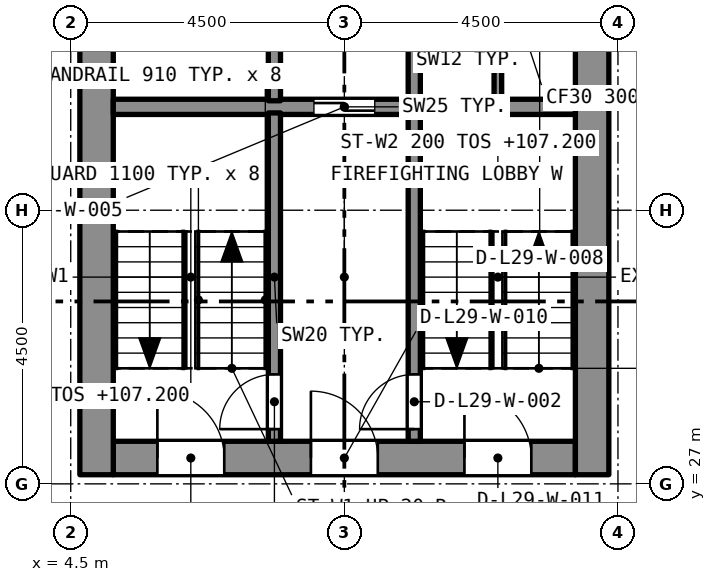
"""IFC4 building model, lengths in metres.
Left out: names, types, materials, properties, quantities, classifications, styles, units other than length and angle.
Written with IfcOpenShell. Run it as: python <this file> out.ifc"""

import sys

from ifc_helpers import new_model, si_unit, direction, frame, frame_2d, origin, place, context, subcontext, project, spatial, rectangle, extrude, element, fill, save


model = new_model("IFC4")
c1 = context("Model", 3, precision=1e-05, world=origin(), true_north=direction((0.0, 1.0)))
c2 = subcontext(c1, "Body", "Model", "MODEL_VIEW")
j1 = project(units=[si_unit("LENGTHUNIT", "METRE"), si_unit("PLANEANGLEUNIT", "RADIAN")], contexts=[c1])
p1 = place(None, origin())
s1 = spatial("IfcSite", under=j1, at=p1, CompositionType="ELEMENT")
p2 = place(p1, origin())
s2 = spatial("IfcBuilding", under=s1, at=p2, CompositionType="ELEMENT")
p3 = place(p2, frame((0.0, 0.0, 105.6)))
s3 = spatial("IfcBuildingStorey", under=s2, at=p3, CompositionType="ELEMENT", Elevation=105.6)
p4 = place(p3, frame((5.2, 27.425, 0.0), z_axis=(0.0, 0.0, 1.0), x_axis=(1.0, 0.0, 0.0)))
e1 = element("IfcWall", 1, at=p4, inside=s3, PredefinedType="SOLIDWALL", context=c2, shape_type="SweptSolid", body=[
    extrude(rectangle(XDim=7.6, YDim=0.55, at=frame_2d((3.8, 0.0))), origin(), (0.0, 0.0, 1.0), 3.2),
])
p5 = place(p4, frame((0.725, 0.0, 0.0)))
e2 = element("IfcOpeningElement", 2, at=p5, cuts=e1, PredefinedType="OPENING", context=c2, shape_type="SweptSolid", body=[
    extrude(rectangle(XDim=1.1, YDim=2.1, at=frame_2d((0.55, 1.05))), frame((0.0, 0.285, 0.0), z_axis=(0.0, -1.0, 0.0), x_axis=(1.0, 0.0, 0.0)), (0.0, 0.0, 1.0), 0.57),
])
p6 = place(p4, frame((3.25, 0.0, 0.0)))
e3 = element("IfcOpeningElement", 3, at=p6, cuts=e1, PredefinedType="OPENING", context=c2, shape_type="SweptSolid", body=[
    extrude(rectangle(XDim=1.1, YDim=2.1, at=frame_2d((0.55, 1.05))), frame((0.0, 0.285, 0.0), z_axis=(0.0, -1.0, 0.0), x_axis=(1.0, 0.0, 0.0)), (0.0, 0.0, 1.0), 0.57),
])
p7 = place(p4, frame((5.775, 0.0, 0.0)))
e4 = element("IfcOpeningElement", 4, at=p7, cuts=e1, PredefinedType="OPENING", context=c2, shape_type="SweptSolid", body=[
    extrude(rectangle(XDim=1.1, YDim=2.1, at=frame_2d((0.55, 1.05))), frame((0.0, 0.285, 0.0), z_axis=(0.0, -1.0, 0.0), x_axis=(1.0, 0.0, 0.0)), (0.0, 0.0, 1.0), 0.57),
])
p8 = place(p3, frame((4.925, 27.15, 0.0), z_axis=(0.0, 0.0, 1.0), x_axis=(0.0, 1.0, 0.0)))
e5 = element("IfcWall", 5, at=p8, inside=s3, PredefinedType="SOLIDWALL", context=c2, shape_type="SweptSolid", body=[
    extrude(rectangle(XDim=13.2, YDim=0.55, at=frame_2d((6.6, 0.0))), origin(), (0.0, 0.0, 1.0), 3.2),
])
p9 = place(p8, frame((8.8, 0.0, 0.0)))
e6 = element("IfcOpeningElement", 6, at=p9, cuts=e5, PredefinedType="OPENING", context=c2, shape_type="SweptSolid", body=[
    extrude(rectangle(XDim=1.2, YDim=2.1, at=frame_2d((0.6, 1.05))), frame((0.0, 0.285, 0.0), z_axis=(0.0, -1.0, 0.0), x_axis=(1.0, 0.0, 0.0)), (0.0, 0.0, 1.0), 0.57),
])
p10 = place(p3, frame((13.075, 27.15, 0.0), z_axis=(0.0, 0.0, 1.0), x_axis=(0.0, 1.0, 0.0)))
e7 = element("IfcWall", 7, at=p10, inside=s3, PredefinedType="SOLIDWALL", context=c2, shape_type="SweptSolid", body=[
    extrude(rectangle(XDim=13.2, YDim=0.55, at=frame_2d((6.6, 0.0))), origin(), (0.0, 0.0, 1.0), 3.2),
])
p11 = place(p10, frame((10.95, 0.0, 0.0)))
e8 = element("IfcOpeningElement", 8, at=p11, cuts=e7, PredefinedType="OPENING", context=c2, shape_type="SweptSolid", body=[
    extrude(rectangle(XDim=1.1, YDim=2.1, at=frame_2d((0.55, 1.05))), frame((0.0, 0.285, 0.0), z_axis=(0.0, -1.0, 0.0), x_axis=(1.0, 0.0, 0.0)), (0.0, 0.0, 1.0), 0.57),
])
p12 = place(p10, frame((8.8, 0.0, 0.0)))
e9 = element("IfcOpeningElement", 9, at=p12, cuts=e7, PredefinedType="OPENING", context=c2, shape_type="SweptSolid", body=[
    extrude(rectangle(XDim=1.2, YDim=2.1, at=frame_2d((0.6, 1.05))), frame((0.0, 0.285, 0.0), z_axis=(0.0, -1.0, 0.0), x_axis=(1.0, 0.0, 0.0)), (0.0, 0.0, 1.0), 0.57),
])
p13 = place(p3, frame((5.2, 33.2, 0.0), z_axis=(0.0, 0.0, 1.0), x_axis=(1.0, 0.0, 0.0)))
e10 = element("IfcWall", 10, at=p13, inside=s3, PredefinedType="SOLIDWALL", context=c2, shape_type="SweptSolid", body=[
    extrude(rectangle(XDim=7.6, YDim=0.25, at=frame_2d((3.8, 0.0))), origin(), (0.0, 0.0, 1.0), 2.9),
])
p14 = place(p13, frame((3.3, 0.0, 0.0)))
e11 = element("IfcOpeningElement", 11, at=p14, cuts=e10, PredefinedType="OPENING", context=c2, shape_type="SweptSolid", body=[
    extrude(rectangle(XDim=1.0, YDim=2.1, at=frame_2d((0.5, 1.05))), frame((0.0, 0.135, 0.0), z_axis=(0.0, -1.0, 0.0), x_axis=(1.0, 0.0, 0.0)), (0.0, 0.0, 1.0), 0.27),
])
p15 = place(p3, frame((7.85, 27.7, 0.0), z_axis=(0.0, 0.0, 1.0), x_axis=(0.0, 1.0, 0.0)))
e12 = element("IfcWall", 12, at=p15, inside=s3, PredefinedType="SOLIDWALL", context=c2, shape_type="SweptSolid", body=[
    extrude(rectangle(XDim=5.4, YDim=0.2, at=frame_2d((2.7, 0.0))), origin(), (0.0, 0.0, 1.0), 2.9),
])
p16 = place(p15, frame((0.2, 0.0, 0.0)))
e13 = element("IfcOpeningElement", 13, at=p16, cuts=e12, PredefinedType="OPENING", context=c2, shape_type="SweptSolid", body=[
    extrude(rectangle(XDim=0.9, YDim=2.1, at=frame_2d((0.45, 1.05))), frame((0.0, 0.11, 0.0), z_axis=(0.0, -1.0, 0.0), x_axis=(1.0, 0.0, 0.0)), (0.0, 0.0, 1.0), 0.22),
])
p17 = place(p3, frame((10.15, 27.7, 0.0), z_axis=(0.0, 0.0, 1.0), x_axis=(0.0, 1.0, 0.0)))
e14 = element("IfcWall", 14, at=p17, inside=s3, PredefinedType="SOLIDWALL", context=c2, shape_type="SweptSolid", body=[
    extrude(rectangle(XDim=5.4, YDim=0.2, at=frame_2d((2.7, 0.0))), origin(), (0.0, 0.0, 1.0), 2.9),
])
p18 = place(p17, frame((0.2, 0.0, 0.0)))
e15 = element("IfcOpeningElement", 15, at=p18, cuts=e14, PredefinedType="OPENING", context=c2, shape_type="SweptSolid", body=[
    extrude(rectangle(XDim=0.9, YDim=2.1, at=frame_2d((0.45, 1.05))), frame((0.0, 0.11, 0.0), z_axis=(0.0, -1.0, 0.0), x_axis=(1.0, 0.0, 0.0)), (0.0, 0.0, 1.0), 0.22),
])
for number, where, z_axis, x_axis in (
    (16, (7.85, 33.3, 0.0), (0.0, 0.0, 1.0), (0.0, 1.0, 0.0)),
    (17, (10.15, 33.3, 0.0), (0.0, 0.0, 1.0), (0.0, 1.0, 0.0)),
):
    element("IfcWall", number, at=place(p3, frame(where, z_axis=z_axis, x_axis=x_axis)), inside=s3, PredefinedType="SOLIDWALL", context=c2, shape_type="SweptSolid", body=[
        extrude(rectangle(XDim=2.3, YDim=0.2, at=frame_2d((1.15, 0.0))), origin(), (0.0, 0.0, 1.0), 2.9),
    ])
p19 = place(p3, frame((11.525, 33.3, 0.0), z_axis=(0.0, 0.0, 1.0), x_axis=(0.0, 1.0, 0.0)))
e18 = element("IfcWall", 18, at=p19, inside=s3, PredefinedType="PARTITIONING", context=c2, shape_type="SweptSolid", body=[
    extrude(rectangle(XDim=2.3, YDim=0.125, at=frame_2d((1.15, 0.0))), origin(), (0.0, 0.0, 1.0), 2.9),
])
p20 = place(p16, origin())
e19 = element("IfcDoor", 19, at=p20, inside=s3, OperationType="SINGLE_SWING_LEFT", PredefinedType="DOOR", context=c2, shape_type="SweptSolid", body=[
    extrude(rectangle(XDim=0.9, YDim=2.1, at=frame_2d((0.45, 1.05))), frame((0.0, 0.025, 0.0), z_axis=(0.0, -1.0, 0.0), x_axis=(1.0, 0.0, 0.0)), (0.0, 0.0, 1.0), 0.05),
])
fill(e13, e19)
p21 = place(p18, origin())
e20 = element("IfcDoor", 20, at=p21, inside=s3, OperationType="SINGLE_SWING_LEFT", PredefinedType="DOOR", context=c2, shape_type="SweptSolid", body=[
    extrude(rectangle(XDim=0.9, YDim=2.1, at=frame_2d((0.45, 1.05))), frame((0.0, 0.025, 0.0), z_axis=(0.0, -1.0, 0.0), x_axis=(1.0, 0.0, 0.0)), (0.0, 0.0, 1.0), 0.05),
])
fill(e15, e20)
p22 = place(p14, origin())
e21 = element("IfcDoor", 21, at=p22, inside=s3, OperationType="SLIDING_TO_LEFT", PredefinedType="DOOR", context=c2, shape_type="SweptSolid", body=[
    extrude(rectangle(XDim=1.0, YDim=2.1, at=frame_2d((0.5, 1.05))), frame((0.0, 0.025, 0.0), z_axis=(0.0, -1.0, 0.0), x_axis=(1.0, 0.0, 0.0)), (0.0, 0.0, 1.0), 0.05),
])
fill(e11, e21)
p23 = place(p5, origin())
e22 = element("IfcDoor", 22, at=p23, inside=s3, OperationType="SINGLE_SWING_LEFT", PredefinedType="DOOR", context=c2, shape_type="SweptSolid", body=[
    extrude(rectangle(XDim=1.1, YDim=2.1, at=frame_2d((0.55, 1.05))), frame((0.0, 0.025, 0.0), z_axis=(0.0, -1.0, 0.0), x_axis=(1.0, 0.0, 0.0)), (0.0, 0.0, 1.0), 0.05),
])
fill(e2, e22)
p24 = place(p6, origin())
e23 = element("IfcDoor", 23, at=p24, inside=s3, OperationType="SINGLE_SWING_LEFT", PredefinedType="DOOR", context=c2, shape_type="SweptSolid", body=[
    extrude(rectangle(XDim=1.1, YDim=2.1, at=frame_2d((0.55, 1.05))), frame((0.0, 0.025, 0.0), z_axis=(0.0, -1.0, 0.0), x_axis=(1.0, 0.0, 0.0)), (0.0, 0.0, 1.0), 0.05),
])
fill(e3, e23)
p25 = place(p7, origin())
e24 = element("IfcDoor", 24, at=p25, inside=s3, OperationType="SINGLE_SWING_LEFT", PredefinedType="DOOR", context=c2, shape_type="SweptSolid", body=[
    extrude(rectangle(XDim=1.1, YDim=2.1, at=frame_2d((0.55, 1.05))), frame((0.0, 0.025, 0.0), z_axis=(0.0, -1.0, 0.0), x_axis=(1.0, 0.0, 0.0)), (0.0, 0.0, 1.0), 0.05),
])
fill(e4, e24)
save(model, sys.argv[1])
